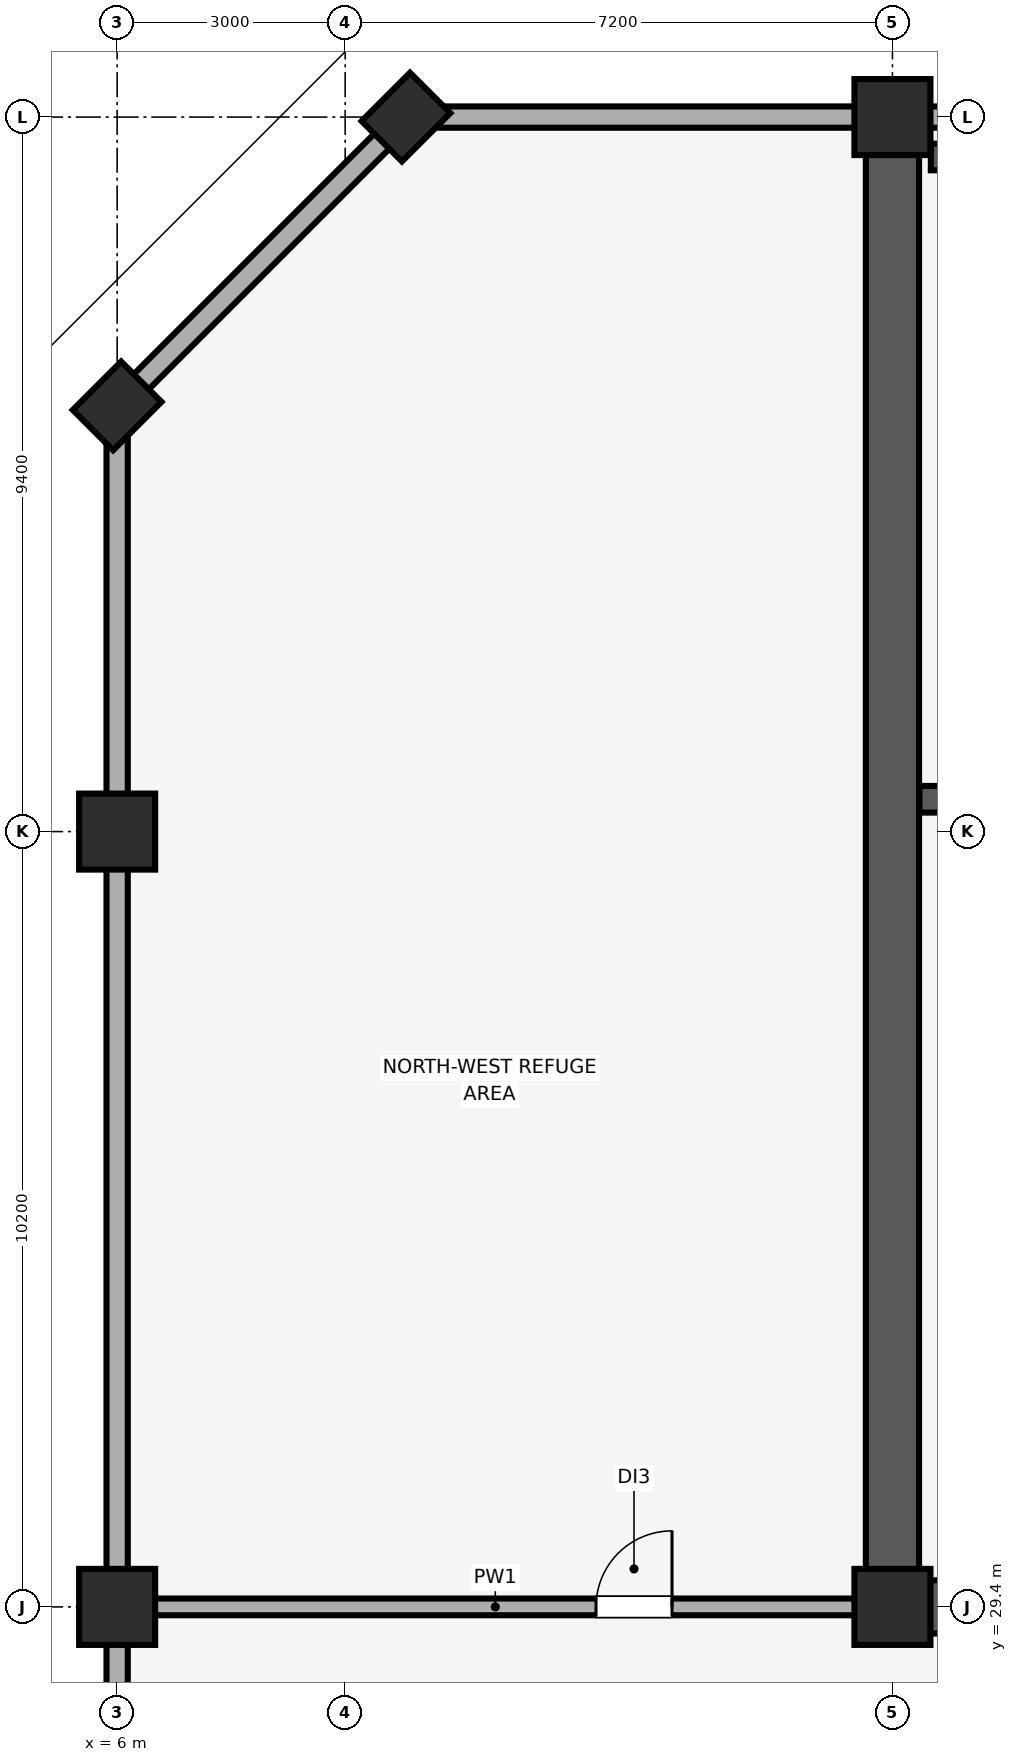
"""IFC4 building model, lengths in metres.
Left out: names, types, materials, properties, quantities, classifications, styles, units other than length and angle.
Written with IfcOpenShell. Run it as: python <this file> out.ifc"""

import sys

from ifc_helpers import new_model, si_unit, direction, frame, frame_2d, origin, origin_2d, place, context, subcontext, project, spatial, rectangle, extrude, element, fill, save


model = new_model("IFC4")
c1 = context("Model", 3, precision=1e-05, world=origin(), true_north=direction((0.0, 1.0)))
c2 = subcontext(c1, "Body", "Model", "MODEL_VIEW")
j1 = project(units=[si_unit("LENGTHUNIT", "METRE"), si_unit("PLANEANGLEUNIT", "RADIAN")], contexts=[c1])
p1 = place(None, origin())
s1 = spatial("IfcSite", under=j1, at=p1, CompositionType="ELEMENT")
p2 = place(p1, origin())
s2 = spatial("IfcBuilding", under=s1, at=p2, CompositionType="ELEMENT")
p3 = place(p2, frame((0.0, 0.0, 280.5)))
s3 = spatial("IfcBuildingStorey", under=s2, at=p3, CompositionType="ELEMENT", Elevation=280.5)
for number, where, z_axis, x_axis in (
    (1, (6.0, 29.4, 0.0), (0.0, 0.0, 1.0), (1.0, 0.0, 0.0)),
    (2, (6.0, 39.6, 0.0), (0.0, 0.0, 1.0), (1.0, 0.0, 0.0)),
):
    element("IfcColumn", number, at=place(p3, frame(where, z_axis=z_axis, x_axis=x_axis)), inside=s3, PredefinedType="COLUMN", context=c2, shape_type="SweptSolid", body=[
        extrude(rectangle(XDim=1.0, YDim=1.0, at=origin_2d()), origin(), (0.0, 0.0, 1.0), 5.1),
    ])
for number, where, z_axis, x_axis in (
    (3, (9.8, 49.0, 0.0), (0.0, 0.0, 1.0), (0.707, 0.707, 0.0)),
    (4, (6.0, 45.2, 0.0), (0.0, 0.0, 1.0), (0.707, 0.707, 0.0)),
):
    element("IfcColumn", number, at=place(p3, frame(where, z_axis=z_axis, x_axis=x_axis)), inside=s3, PredefinedType="PILASTER", context=c2, shape_type="SweptSolid", body=[
        extrude(rectangle(XDim=0.9, YDim=0.75, at=origin_2d()), origin(), (0.0, 0.0, 1.0), 5.1),
    ])
for number, where, z_axis, x_axis in (
    (5, (16.2, 29.4, 0.0), (0.0, 0.0, 1.0), (1.0, 0.0, 0.0)),
    (6, (16.2, 49.0, 0.0), (0.0, 0.0, 1.0), (1.0, 0.0, 0.0)),
):
    element("IfcColumn", number, at=place(p3, frame(where, z_axis=z_axis, x_axis=x_axis)), inside=s3, PredefinedType="COLUMN", context=c2, shape_type="SweptSolid", body=[
        extrude(rectangle(XDim=1.0, YDim=1.0, at=origin_2d()), origin(), (0.0, 0.0, 1.0), 5.1),
    ])
p4 = place(p3, frame((74.2, 49.0, 0.0), z_axis=(0.0, 0.0, 1.0), x_axis=(-1.0, 0.0, 0.0)))
e7 = element("IfcWall", 7, at=p4, inside=s3, PredefinedType="SOLIDWALL", context=c2, shape_type="SweptSolid", body=[
    extrude(rectangle(XDim=64.4, YDim=0.28, at=frame_2d((32.2, 0.0))), origin(), (0.0, 0.0, 1.0), 4.0),
])
p5 = place(p3, frame((9.8, 49.0, 0.0), z_axis=(0.0, 0.0, 1.0), x_axis=(-0.707106781187, -0.707106781187, 0.0)))
e8 = element("IfcWall", 8, at=p5, inside=s3, PredefinedType="SOLIDWALL", context=c2, shape_type="SweptSolid", body=[
    extrude(rectangle(XDim=5.374, YDim=0.28, at=frame_2d((2.687, 0.0))), origin(), (0.0, 0.0, 1.0), 5.1),
])
p6 = place(p3, frame((6.0, 45.2, 0.0), z_axis=(0.0, 0.0, 1.0), x_axis=(0.0, -1.0, 0.0)))
e9 = element("IfcWall", 9, at=p6, inside=s3, PredefinedType="SOLIDWALL", context=c2, shape_type="SweptSolid", body=[
    extrude(rectangle(XDim=35.4, YDim=0.28, at=frame_2d((17.7, 0.0))), origin(), (0.0, 0.0, 1.0), 5.1),
])
p7 = place(p3, frame((16.2, 29.4, 0.0), z_axis=(0.0, 0.0, 1.0), x_axis=(0.0, 1.0, 0.0)))
e10 = element("IfcWall", 10, at=p7, inside=s3, PredefinedType="SHEAR", context=c2, shape_type="SweptSolid", body=[
    extrude(rectangle(XDim=19.2, YDim=0.7, at=frame_2d((9.6, 0.0))), origin(), (0.0, 0.0, 1.0), 5.1),
])
p8 = place(p3, frame((16.555, 29.4, 0.0), z_axis=(0.0, 0.0, 1.0), x_axis=(1.0, 0.0, 0.0)))
e11 = element("IfcWall", 11, at=p8, inside=s3, PredefinedType="SHEAR", context=c2, shape_type="SweptSolid", body=[
    extrude(rectangle(XDim=7.045, YDim=0.7, at=frame_2d((3.522, 0.0))), origin(), (0.0, 0.0, 1.0), 5.1),
])
p9 = place(p3, frame((16.555, 40.025, 0.0), z_axis=(0.0, 0.0, 1.0), x_axis=(1.0, 0.0, 0.0)))
e12 = element("IfcWall", 12, at=p9, inside=s3, PredefinedType="SHEAR", context=c2, shape_type="SweptSolid", body=[
    extrude(rectangle(XDim=4.3, YDim=0.35, at=frame_2d((2.15, 0.0))), origin(), (0.0, 0.0, 1.0), 5.1),
])
p10 = place(p9, frame((1.91, 0.0, 0.0)))
e13 = element("IfcOpeningElement", 13, at=p10, cuts=e12, PredefinedType="OPENING", context=c2, shape_type="SweptSolid", body=[
    extrude(rectangle(XDim=1.15, YDim=2.15, at=frame_2d((0.575, 1.075))), frame((0.0, 0.185, 0.0), z_axis=(0.0, -1.0, 0.0), x_axis=(1.0, 0.0, 0.0)), (0.0, 0.0, 1.0), 0.37),
])
p11 = place(p3, frame((16.705, 48.475, 0.0), z_axis=(0.0, 0.0, 1.0), x_axis=(1.0, 0.0, 0.0)))
e14 = element("IfcWall", 14, at=p11, inside=s3, PredefinedType="SHEAR", context=c2, shape_type="SweptSolid", body=[
    extrude(rectangle(XDim=4.15, YDim=0.35, at=frame_2d((2.075, 0.0))), origin(), (0.0, 0.0, 1.0), 5.1),
])
p12 = place(p3, frame((6.15, 29.4, 0.0), z_axis=(0.0, 0.0, 1.0), x_axis=(1.0, 0.0, 0.0)))
e15 = element("IfcWall", 15, at=p12, inside=s3, PredefinedType="PARTITIONING", context=c2, shape_type="SweptSolid", body=[
    extrude(rectangle(XDim=9.65, YDim=0.22, at=frame_2d((4.825, 0.0))), origin(), (0.0, 0.0, 1.0), 4.0),
])
p13 = place(p12, frame((6.15, 0.0, 0.0)))
e16 = element("IfcOpeningElement", 16, at=p13, cuts=e15, PredefinedType="OPENING", context=c2, shape_type="SweptSolid", body=[
    extrude(rectangle(XDim=1.0, YDim=2.15, at=frame_2d((0.5, 1.075))), frame((0.0, 0.12, 0.0), z_axis=(0.0, -1.0, 0.0), x_axis=(1.0, 0.0, 0.0)), (0.0, 0.0, 1.0), 0.24),
])
p14 = place(p13, origin())
e17 = element("IfcDoor", 17, at=p14, inside=s3, OperationType="SINGLE_SWING_RIGHT", PredefinedType="DOOR", context=c2, shape_type="SweptSolid", body=[
    extrude(rectangle(XDim=1.0, YDim=2.15, at=frame_2d((0.5, 1.075))), frame((0.0, 0.025, 0.0), z_axis=(0.0, -1.0, 0.0), x_axis=(1.0, 0.0, 0.0)), (0.0, 0.0, 1.0), 0.05),
])
fill(e16, e17)
save(model, sys.argv[1])
